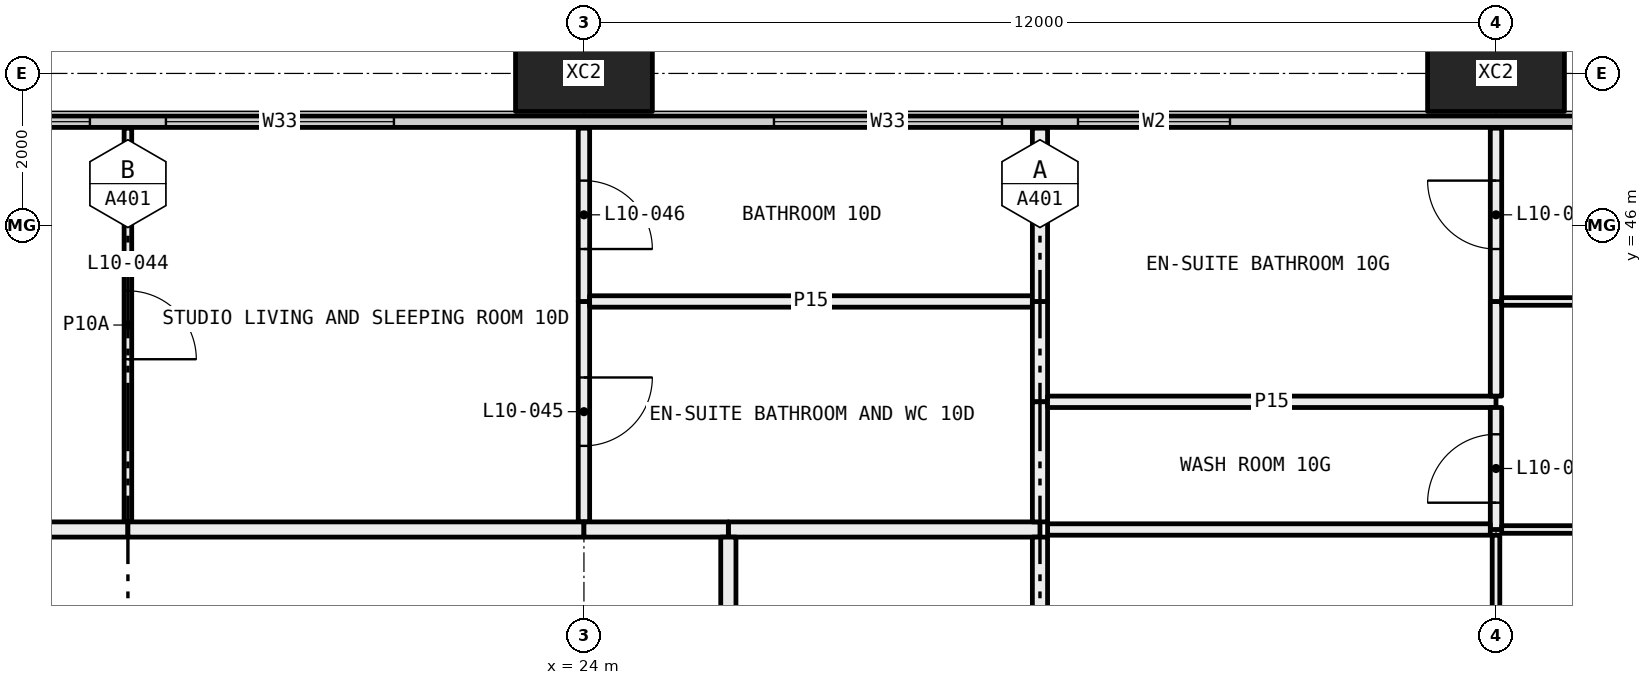
"""IFC4 building model, lengths in metres.
Left out: names, types, materials, properties, quantities, classifications, styles, units other than length and angle.
Written with IfcOpenShell. Run it as: python <this file> out.ifc"""

import sys

from ifc_helpers import new_model, si_unit, direction, frame, frame_2d, origin, origin_2d, place, context, subcontext, project, spatial, rectangle, hollow_rectangle, extrude, element, fill, save


model = new_model("IFC4")
c1 = context("Model", 3, precision=1e-05, world=origin(), true_north=direction((0.0, 1.0)))
c2 = subcontext(c1, "Body", "Model", "MODEL_VIEW")
j1 = project(units=[si_unit("LENGTHUNIT", "METRE"), si_unit("PLANEANGLEUNIT", "RADIAN")], contexts=[c1])
p1 = place(None, origin())
s1 = spatial("IfcSite", under=j1, at=p1, CompositionType="ELEMENT")
p2 = place(p1, origin())
s2 = spatial("IfcBuilding", under=s1, at=p2, CompositionType="ELEMENT")
p3 = place(p2, frame((0.0, 0.0, 47.25)))
s3 = spatial("IfcBuildingStorey", under=s2, at=p3, CompositionType="ELEMENT", Elevation=47.25)
for number, where, z_axis, x_axis in (
    (1, (24.0, 48.0, -0.4), (0.0, 0.0, 1.0), (1.0, 0.0, 0.0)),
    (2, (36.0, 48.0, -0.4), (0.0, 0.0, 1.0), (1.0, 0.0, 0.0)),
):
    element("IfcColumn", number, at=place(p3, frame(where, z_axis=z_axis, x_axis=x_axis)), inside=s3, PredefinedType="COLUMN", context=c2, shape_type="SweptSolid", body=[
        extrude(hollow_rectangle(XDim=1.8, YDim=1.0, WallThickness=0.07, at=origin_2d()), origin(), (0.0, 0.0, 1.0), 3.45),
    ])
p4 = place(p3, frame((6.56, 47.365, 0.0), z_axis=(0.0, 0.0, 1.0), x_axis=(1.0, 0.0, 0.0)))
e3 = element("IfcWall", 3, at=p4, inside=s3, PredefinedType="ELEMENTEDWALL", context=c2, shape_type="SweptSolid", body=[
    extrude(rectangle(XDim=58.88, YDim=0.15, at=frame_2d((29.44, 0.0))), origin(), (0.0, 0.0, 1.0), 3.05),
])
p5 = place(p4, frame((0.44, 0.0, 0.45)))
e4 = element("IfcOpeningElement", 4, at=p5, cuts=e3, PredefinedType="OPENING", context=c2, shape_type="SweptSolid", body=[
    extrude(rectangle(XDim=4.5, YDim=2.55, at=frame_2d((2.25, 1.275))), frame((0.0, 0.085, 0.0), z_axis=(0.0, -1.0, 0.0), x_axis=(1.0, 0.0, 0.0)), (0.0, 0.0, 1.0), 0.17),
])
p6 = place(p4, frame((7.94, 0.0, 0.45)))
e5 = element("IfcOpeningElement", 5, at=p6, cuts=e3, PredefinedType="OPENING", context=c2, shape_type="SweptSolid", body=[
    extrude(rectangle(XDim=3.0, YDim=2.55, at=frame_2d((1.5, 1.275))), frame((0.0, 0.085, 0.0), z_axis=(0.0, -1.0, 0.0), x_axis=(1.0, 0.0, 0.0)), (0.0, 0.0, 1.0), 0.17),
])
p7 = place(p4, frame((11.94, 0.0, 0.45)))
e6 = element("IfcOpeningElement", 6, at=p7, cuts=e3, PredefinedType="OPENING", context=c2, shape_type="SweptSolid", body=[
    extrude(rectangle(XDim=3.0, YDim=2.55, at=frame_2d((1.5, 1.275))), frame((0.0, 0.085, 0.0), z_axis=(0.0, -1.0, 0.0), x_axis=(1.0, 0.0, 0.0)), (0.0, 0.0, 1.0), 0.17),
])
p8 = place(p4, frame((19.94, 0.0, 0.45)))
e7 = element("IfcOpeningElement", 7, at=p8, cuts=e3, PredefinedType="OPENING", context=c2, shape_type="SweptSolid", body=[
    extrude(rectangle(XDim=3.0, YDim=2.55, at=frame_2d((1.5, 1.275))), frame((0.0, 0.085, 0.0), z_axis=(0.0, -1.0, 0.0), x_axis=(1.0, 0.0, 0.0)), (0.0, 0.0, 1.0), 0.17),
])
p9 = place(p4, frame((23.94, 0.0, 0.45)))
e8 = element("IfcOpeningElement", 8, at=p9, cuts=e3, PredefinedType="OPENING", context=c2, shape_type="SweptSolid", body=[
    extrude(rectangle(XDim=2.0, YDim=2.55, at=frame_2d((1.0, 1.275))), frame((0.0, 0.085, 0.0), z_axis=(0.0, -1.0, 0.0), x_axis=(1.0, 0.0, 0.0)), (0.0, 0.0, 1.0), 0.17),
])
p10 = place(p4, frame((31.94, 0.0, 0.45)))
e9 = element("IfcOpeningElement", 9, at=p10, cuts=e3, PredefinedType="OPENING", context=c2, shape_type="SweptSolid", body=[
    extrude(rectangle(XDim=3.0, YDim=2.55, at=frame_2d((1.5, 1.275))), frame((0.0, 0.085, 0.0), z_axis=(0.0, -1.0, 0.0), x_axis=(1.0, 0.0, 0.0)), (0.0, 0.0, 1.0), 0.17),
])
p11 = place(p4, frame((35.94, 0.0, 0.45)))
e10 = element("IfcOpeningElement", 10, at=p11, cuts=e3, PredefinedType="OPENING", context=c2, shape_type="SweptSolid", body=[
    extrude(rectangle(XDim=3.0, YDim=2.55, at=frame_2d((1.5, 1.275))), frame((0.0, 0.085, 0.0), z_axis=(0.0, -1.0, 0.0), x_axis=(1.0, 0.0, 0.0)), (0.0, 0.0, 1.0), 0.17),
])
p12 = place(p4, frame((43.94, 0.0, 0.45)))
e11 = element("IfcOpeningElement", 11, at=p12, cuts=e3, PredefinedType="OPENING", context=c2, shape_type="SweptSolid", body=[
    extrude(rectangle(XDim=3.0, YDim=2.55, at=frame_2d((1.5, 1.275))), frame((0.0, 0.085, 0.0), z_axis=(0.0, -1.0, 0.0), x_axis=(1.0, 0.0, 0.0)), (0.0, 0.0, 1.0), 0.17),
])
p13 = place(p4, frame((47.94, 0.0, 0.45)))
e12 = element("IfcOpeningElement", 12, at=p13, cuts=e3, PredefinedType="OPENING", context=c2, shape_type="SweptSolid", body=[
    extrude(rectangle(XDim=2.0, YDim=2.55, at=frame_2d((1.0, 1.275))), frame((0.0, 0.085, 0.0), z_axis=(0.0, -1.0, 0.0), x_axis=(1.0, 0.0, 0.0)), (0.0, 0.0, 1.0), 0.17),
])
p14 = place(p4, frame((53.94, 0.0, 0.45)))
e13 = element("IfcOpeningElement", 13, at=p14, cuts=e3, PredefinedType="OPENING", context=c2, shape_type="SweptSolid", body=[
    extrude(rectangle(XDim=4.5, YDim=2.55, at=frame_2d((2.25, 1.275))), frame((0.0, 0.085, 0.0), z_axis=(0.0, -1.0, 0.0), x_axis=(1.0, 0.0, 0.0)), (0.0, 0.0, 1.0), 0.17),
])
p15 = place(p3, frame((18.0, 42.1, 0.0), z_axis=(0.0, 0.0, 1.0), x_axis=(0.0, 1.0, 0.0)))
e14 = element("IfcWall", 14, at=p15, inside=s3, PredefinedType="PARTITIONING", context=c2, shape_type="SweptSolid", body=[
    extrude(rectangle(XDim=5.18, YDim=0.1, at=frame_2d((2.59, 0.0))), origin(), (0.0, 0.0, 1.0), 3.05),
])
p16 = place(p15, frame((2.14, 0.0, 0.0)))
e15 = element("IfcOpeningElement", 15, at=p16, cuts=e14, PredefinedType="OPENING", context=c2, shape_type="SweptSolid", body=[
    extrude(rectangle(XDim=0.9, YDim=2.1, at=frame_2d((0.45, 1.05))), frame((0.0, 0.06, 0.0), z_axis=(0.0, -1.0, 0.0), x_axis=(1.0, 0.0, 0.0)), (0.0, 0.0, 1.0), 0.12),
])
p17 = place(p3, frame((12.0, 42.0, 0.0), z_axis=(0.0, 0.0, 1.0), x_axis=(1.0, 0.0, 0.0)))
e16 = element("IfcWall", 16, at=p17, inside=s3, PredefinedType="PARTITIONING", context=c2, shape_type="SweptSolid", body=[
    extrude(rectangle(XDim=6.0, YDim=0.2, at=frame_2d((3.0, 0.0))), origin(), (0.0, 0.0, 1.0), 3.05),
])
p18 = place(p17, frame((2.5, 0.0, 0.0)))
e17 = element("IfcOpeningElement", 17, at=p18, cuts=e16, PredefinedType="OPENING", context=c2, shape_type="SweptSolid", body=[
    extrude(rectangle(XDim=1.0, YDim=2.1, at=frame_2d((0.5, 1.05))), frame((0.0, 0.11, 0.0), z_axis=(0.0, -1.0, 0.0), x_axis=(1.0, 0.0, 0.0)), (0.0, 0.0, 1.0), 0.22),
])
p19 = place(p3, frame((24.0, 42.1, 0.0), z_axis=(0.0, 0.0, 1.0), x_axis=(0.0, 1.0, 0.0)))
e18 = element("IfcWall", 18, at=p19, inside=s3, PredefinedType="PARTITIONING", context=c2, shape_type="SweptSolid", body=[
    extrude(rectangle(XDim=2.9, YDim=0.15, at=frame_2d((1.45, 0.0))), origin(), (0.0, 0.0, 1.0), 3.05),
])
p20 = place(p19, frame((1.0, 0.0, 0.0)))
e19 = element("IfcOpeningElement", 19, at=p20, cuts=e18, PredefinedType="OPENING", context=c2, shape_type="SweptSolid", body=[
    extrude(rectangle(XDim=0.9, YDim=2.1, at=frame_2d((0.45, 1.05))), frame((0.0, 0.085, 0.0), z_axis=(0.0, -1.0, 0.0), x_axis=(1.0, 0.0, 0.0)), (0.0, 0.0, 1.0), 0.17),
])
p21 = place(p3, frame((24.0, 45.0, 0.0), z_axis=(0.0, 0.0, 1.0), x_axis=(0.0, 1.0, 0.0)))
e20 = element("IfcWall", 20, at=p21, inside=s3, PredefinedType="PARTITIONING", context=c2, shape_type="SweptSolid", body=[
    extrude(rectangle(XDim=2.28, YDim=0.15, at=frame_2d((1.14, 0.0))), origin(), (0.0, 0.0, 1.0), 3.05),
])
p22 = place(p21, frame((0.69, 0.0, 0.0)))
e21 = element("IfcOpeningElement", 21, at=p22, cuts=e20, PredefinedType="OPENING", context=c2, shape_type="SweptSolid", body=[
    extrude(rectangle(XDim=0.9, YDim=2.1, at=frame_2d((0.45, 1.05))), frame((0.0, 0.085, 0.0), z_axis=(0.0, -1.0, 0.0), x_axis=(1.0, 0.0, 0.0)), (0.0, 0.0, 1.0), 0.17),
])
p23 = place(p3, frame((18.0, 42.0, 0.0), z_axis=(0.0, 0.0, 1.0), x_axis=(1.0, 0.0, 0.0)))
e22 = element("IfcWall", 22, at=p23, inside=s3, PredefinedType="PARTITIONING", context=c2, shape_type="SweptSolid", body=[
    extrude(rectangle(XDim=6.0, YDim=0.2, at=frame_2d((3.0, 0.0))), origin(), (0.0, 0.0, 1.0), 3.05),
])
p24 = place(p3, frame((29.9, 45.0, 0.0), z_axis=(0.0, 0.0, 1.0), x_axis=(-1.0, 0.0, 0.0)))
e23 = element("IfcWall", 23, at=p24, inside=s3, PredefinedType="PARTITIONING", context=c2, shape_type="SweptSolid", body=[
    extrude(rectangle(XDim=5.825, YDim=0.15, at=frame_2d((2.913, 0.0))), origin(), (0.0, 0.0, 1.0), 3.05),
])
p25 = place(p3, frame((25.9, 42.0, 0.0), z_axis=(0.0, 0.0, 1.0), x_axis=(1.0, 0.0, 0.0)))
e24 = element("IfcWall", 24, at=p25, inside=s3, PredefinedType="PARTITIONING", context=c2, shape_type="SweptSolid", body=[
    extrude(rectangle(XDim=4.1, YDim=0.2, at=frame_2d((2.05, 0.0))), origin(), (0.0, 0.0, 1.0), 3.05),
])
p26 = place(p3, frame((30.0, 43.68, 0.0), z_axis=(0.0, 0.0, 1.0), x_axis=(0.0, 1.0, 0.0)))
e25 = element("IfcWall", 25, at=p26, inside=s3, PredefinedType="PARTITIONING", context=c2, shape_type="SweptSolid", body=[
    extrude(rectangle(XDim=1.32, YDim=0.2, at=frame_2d((0.66, 0.0))), origin(), (0.0, 0.0, 1.0), 3.05),
])
p27 = place(p3, frame((30.0, 42.1, 0.0), z_axis=(0.0, 0.0, 1.0), x_axis=(0.0, 1.0, 0.0)))
e26 = element("IfcWall", 26, at=p27, inside=s3, PredefinedType="PARTITIONING", context=c2, shape_type="SweptSolid", body=[
    extrude(rectangle(XDim=1.58, YDim=0.2, at=frame_2d((0.79, 0.0))), origin(), (0.0, 0.0, 1.0), 3.05),
])
p28 = place(p3, frame((24.0, 42.0, 0.0), z_axis=(0.0, 0.0, 1.0), x_axis=(1.0, 0.0, 0.0)))
e27 = element("IfcWall", 27, at=p28, inside=s3, PredefinedType="PARTITIONING", context=c2, shape_type="SweptSolid", body=[
    extrude(rectangle(XDim=1.9, YDim=0.2, at=frame_2d((0.95, 0.0))), origin(), (0.0, 0.0, 1.0), 3.05),
])
p29 = place(p3, frame((30.0, 45.0, 0.0), z_axis=(0.0, 0.0, 1.0), x_axis=(0.0, 1.0, 0.0)))
e28 = element("IfcWall", 28, at=p29, inside=s3, PredefinedType="PARTITIONING", context=c2, shape_type="SweptSolid", body=[
    extrude(rectangle(XDim=2.28, YDim=0.2, at=frame_2d((1.14, 0.0))), origin(), (0.0, 0.0, 1.0), 3.05),
])
p30 = place(p3, frame((30.0, 36.1, 0.0), z_axis=(0.0, 0.0, 1.0), x_axis=(0.0, 1.0, 0.0)))
e29 = element("IfcWall", 29, at=p30, inside=s3, PredefinedType="PARTITIONING", context=c2, shape_type="SweptSolid", body=[
    extrude(rectangle(XDim=5.8, YDim=0.2, at=frame_2d((2.9, 0.0))), origin(), (0.0, 0.0, 1.0), 3.05),
])
p31 = place(p3, frame((25.9, 41.9, 0.0), z_axis=(0.0, 0.0, 1.0), x_axis=(0.0, -1.0, 0.0)))
e30 = element("IfcWall", 30, at=p31, inside=s3, PredefinedType="PARTITIONING", context=c2, shape_type="SweptSolid", body=[
    extrude(rectangle(XDim=6.0, YDim=0.2, at=frame_2d((3.0, 0.0))), origin(), (0.0, 0.0, 1.0), 2.45),
])
p32 = place(p31, frame((2.55, 0.0, 0.0)))
e31 = element("IfcOpeningElement", 31, at=p32, cuts=e30, PredefinedType="OPENING", context=c2, shape_type="SweptSolid", body=[
    extrude(rectangle(XDim=0.9, YDim=2.1, at=frame_2d((0.45, 1.05))), frame((0.0, 0.11, 0.0), z_axis=(0.0, -1.0, 0.0), x_axis=(1.0, 0.0, 0.0)), (0.0, 0.0, 1.0), 0.22),
])
p33 = place(p3, frame((30.1, 43.68, 0.0), z_axis=(0.0, 0.0, 1.0), x_axis=(1.0, 0.0, 0.0)))
e32 = element("IfcWall", 32, at=p33, inside=s3, PredefinedType="PARTITIONING", context=c2, shape_type="SweptSolid", body=[
    extrude(rectangle(XDim=5.9, YDim=0.15, at=frame_2d((2.95, 0.0))), origin(), (0.0, 0.0, 1.0), 2.45),
])
p34 = place(p3, frame((36.0, 43.755, 0.0), z_axis=(0.0, 0.0, 1.0), x_axis=(0.0, 1.0, 0.0)))
e33 = element("IfcWall", 33, at=p34, inside=s3, PredefinedType="PARTITIONING", context=c2, shape_type="SweptSolid", body=[
    extrude(rectangle(XDim=1.245, YDim=0.15, at=frame_2d((0.623, 0.0))), origin(), (0.0, 0.0, 1.0), 2.45),
])
p35 = place(p3, frame((36.0, 45.0, 0.0), z_axis=(0.0, 0.0, 1.0), x_axis=(0.0, 1.0, 0.0)))
e34 = element("IfcWall", 34, at=p35, inside=s3, PredefinedType="PARTITIONING", context=c2, shape_type="SweptSolid", body=[
    extrude(rectangle(XDim=2.28, YDim=0.15, at=frame_2d((1.14, 0.0))), origin(), (0.0, 0.0, 1.0), 2.45),
])
p36 = place(p35, frame((0.69, 0.0, 0.0)))
e35 = element("IfcOpeningElement", 35, at=p36, cuts=e34, PredefinedType="OPENING", context=c2, shape_type="SweptSolid", body=[
    extrude(rectangle(XDim=0.9, YDim=2.1, at=frame_2d((0.45, 1.05))), frame((0.0, 0.085, 0.0), z_axis=(0.0, -1.0, 0.0), x_axis=(1.0, 0.0, 0.0)), (0.0, 0.0, 1.0), 0.17),
])
p37 = place(p3, frame((36.0, 42.0, 0.0), z_axis=(0.0, 0.0, 1.0), x_axis=(0.0, 1.0, 0.0)))
e36 = element("IfcWall", 36, at=p37, inside=s3, PredefinedType="PARTITIONING", context=c2, shape_type="SweptSolid", body=[
    extrude(rectangle(XDim=1.605, YDim=0.15, at=frame_2d((0.802, 0.0))), origin(), (0.0, 0.0, 1.0), 2.45),
])
p38 = place(p37, frame((0.353, 0.0, 0.0)))
e37 = element("IfcOpeningElement", 37, at=p38, cuts=e36, PredefinedType="OPENING", context=c2, shape_type="SweptSolid", body=[
    extrude(rectangle(XDim=0.9, YDim=2.1, at=frame_2d((0.45, 1.05))), frame((0.0, 0.085, 0.0), z_axis=(0.0, -1.0, 0.0), x_axis=(1.0, 0.0, 0.0)), (0.0, 0.0, 1.0), 0.17),
])
p39 = place(p3, frame((30.1, 42.0, 0.0), z_axis=(0.0, 0.0, 1.0), x_axis=(1.0, 0.0, 0.0)))
e38 = element("IfcWall", 38, at=p39, inside=s3, PredefinedType="PARTITIONING", context=c2, shape_type="SweptSolid", body=[
    extrude(rectangle(XDim=5.825, YDim=0.15, at=frame_2d((2.913, 0.0))), origin(), (0.0, 0.0, 1.0), 2.45),
])
p40 = place(p3, frame((48.0, 45.0, 0.0), z_axis=(0.0, 0.0, 1.0), x_axis=(-1.0, 0.0, 0.0)))
e39 = element("IfcWall", 39, at=p40, inside=s3, PredefinedType="PARTITIONING", context=c2, shape_type="SweptSolid", body=[
    extrude(rectangle(XDim=11.925, YDim=0.1, at=frame_2d((5.962, 0.0))), origin(), (0.0, 0.0, 1.0), 2.45),
])
p41 = place(p40, frame((5.512, 0.0, 0.0)))
e40 = element("IfcOpeningElement", 40, at=p41, cuts=e39, PredefinedType="OPENING", context=c2, shape_type="SweptSolid", body=[
    extrude(rectangle(XDim=0.9, YDim=2.1, at=frame_2d((0.45, 1.05))), frame((0.0, 0.06, 0.0), z_axis=(0.0, -1.0, 0.0), x_axis=(1.0, 0.0, 0.0)), (0.0, 0.0, 1.0), 0.12),
])
p42 = place(p3, frame((36.075, 42.0, 0.0), z_axis=(0.0, 0.0, 1.0), x_axis=(1.0, 0.0, 0.0)))
e41 = element("IfcWall", 41, at=p42, inside=s3, PredefinedType="PARTITIONING", context=c2, shape_type="SweptSolid", body=[
    extrude(rectangle(XDim=5.85, YDim=0.1, at=frame_2d((2.925, 0.0))), origin(), (0.0, 0.0, 1.0), 2.45),
])
p43 = place(p42, frame((2.475, 0.0, 0.0)))
e42 = element("IfcOpeningElement", 42, at=p43, cuts=e41, PredefinedType="OPENING", context=c2, shape_type="SweptSolid", body=[
    extrude(rectangle(XDim=0.9, YDim=2.1, at=frame_2d((0.45, 1.05))), frame((0.0, 0.06, 0.0), z_axis=(0.0, -1.0, 0.0), x_axis=(1.0, 0.0, 0.0)), (0.0, 0.0, 1.0), 0.12),
])
p44 = place(p3, frame((36.0, 36.8, 0.0), z_axis=(0.0, 0.0, 1.0), x_axis=(0.0, 1.0, 0.0)))
e43 = element("IfcWall", 43, at=p44, inside=s3, PredefinedType="PARTITIONING", context=c2, shape_type="SweptSolid", body=[
    extrude(rectangle(XDim=5.125, YDim=0.1, at=frame_2d((2.562, 0.0))), origin(), (0.0, 0.0, 1.0), 2.45),
])
p45 = place(p44, frame((2.113, 0.0, 0.0)))
e44 = element("IfcOpeningElement", 44, at=p45, cuts=e43, PredefinedType="OPENING", context=c2, shape_type="SweptSolid", body=[
    extrude(rectangle(XDim=0.9, YDim=2.1, at=frame_2d((0.45, 1.05))), frame((0.0, 0.06, 0.0), z_axis=(0.0, -1.0, 0.0), x_axis=(1.0, 0.0, 0.0)), (0.0, 0.0, 1.0), 0.12),
])
p46 = place(p6, origin())
e45 = element("IfcWindow", 45, at=p46, inside=s3, PartitioningType="SINGLE_PANEL", PredefinedType="WINDOW", context=c2, shape_type="SweptSolid", body=[
    extrude(rectangle(XDim=3.0, YDim=2.55, at=frame_2d((1.5, 1.275))), frame((0.0, 0.03, 0.0), z_axis=(0.0, -1.0, 0.0), x_axis=(1.0, 0.0, 0.0)), (0.0, 0.0, 1.0), 0.06),
])
fill(e5, e45)
p47 = place(p7, origin())
e46 = element("IfcWindow", 46, at=p47, inside=s3, PartitioningType="SINGLE_PANEL", PredefinedType="WINDOW", context=c2, shape_type="SweptSolid", body=[
    extrude(rectangle(XDim=3.0, YDim=2.55, at=frame_2d((1.5, 1.275))), frame((0.0, 0.03, 0.0), z_axis=(0.0, -1.0, 0.0), x_axis=(1.0, 0.0, 0.0)), (0.0, 0.0, 1.0), 0.06),
])
fill(e6, e46)
p48 = place(p8, origin())
e47 = element("IfcWindow", 47, at=p48, inside=s3, PartitioningType="SINGLE_PANEL", PredefinedType="WINDOW", context=c2, shape_type="SweptSolid", body=[
    extrude(rectangle(XDim=3.0, YDim=2.55, at=frame_2d((1.5, 1.275))), frame((0.0, 0.03, 0.0), z_axis=(0.0, -1.0, 0.0), x_axis=(1.0, 0.0, 0.0)), (0.0, 0.0, 1.0), 0.06),
])
fill(e7, e47)
p49 = place(p9, origin())
e48 = element("IfcWindow", 48, at=p49, inside=s3, PartitioningType="SINGLE_PANEL", PredefinedType="WINDOW", context=c2, shape_type="SweptSolid", body=[
    extrude(rectangle(XDim=2.0, YDim=2.55, at=frame_2d((1.0, 1.275))), frame((0.0, 0.03, 0.0), z_axis=(0.0, -1.0, 0.0), x_axis=(1.0, 0.0, 0.0)), (0.0, 0.0, 1.0), 0.06),
])
fill(e8, e48)
p50 = place(p16, frame((0.9, 0.0, 0.0), x_axis=(-1.0, 0.0, 0.0)))
e49 = element("IfcDoor", 49, at=p50, inside=s3, OperationType="SINGLE_SWING_LEFT", PredefinedType="DOOR", context=c2, shape_type="SweptSolid", body=[
    extrude(rectangle(XDim=0.9, YDim=2.1, at=frame_2d((0.45, 1.05))), frame((0.0, 0.025, 0.0), z_axis=(0.0, -1.0, 0.0), x_axis=(1.0, 0.0, 0.0)), (0.0, 0.0, 1.0), 0.05),
])
fill(e15, e49)
p51 = place(p20, frame((0.9, 0.0, 0.0), x_axis=(-1.0, 0.0, 0.0)))
e50 = element("IfcDoor", 50, at=p51, inside=s3, OperationType="SINGLE_SWING_RIGHT", PredefinedType="DOOR", context=c2, shape_type="SweptSolid", body=[
    extrude(rectangle(XDim=0.9, YDim=2.1, at=frame_2d((0.45, 1.05))), frame((0.0, 0.025, 0.0), z_axis=(0.0, -1.0, 0.0), x_axis=(1.0, 0.0, 0.0)), (0.0, 0.0, 1.0), 0.05),
])
fill(e19, e50)
p52 = place(p22, frame((0.9, 0.0, 0.0), x_axis=(-1.0, 0.0, 0.0)))
e51 = element("IfcDoor", 51, at=p52, inside=s3, OperationType="SINGLE_SWING_LEFT", PredefinedType="DOOR", context=c2, shape_type="SweptSolid", body=[
    extrude(rectangle(XDim=0.9, YDim=2.1, at=frame_2d((0.45, 1.05))), frame((0.0, 0.025, 0.0), z_axis=(0.0, -1.0, 0.0), x_axis=(1.0, 0.0, 0.0)), (0.0, 0.0, 1.0), 0.05),
])
fill(e21, e51)
p53 = place(p36, origin())
e52 = element("IfcDoor", 52, at=p53, inside=s3, OperationType="SINGLE_SWING_LEFT", PredefinedType="DOOR", context=c2, shape_type="SweptSolid", body=[
    extrude(rectangle(XDim=0.9, YDim=2.1, at=frame_2d((0.45, 1.05))), frame((0.0, 0.025, 0.0), z_axis=(0.0, -1.0, 0.0), x_axis=(1.0, 0.0, 0.0)), (0.0, 0.0, 1.0), 0.05),
])
fill(e35, e52)
p54 = place(p38, origin())
e53 = element("IfcDoor", 53, at=p54, inside=s3, OperationType="SINGLE_SWING_RIGHT", PredefinedType="DOOR", context=c2, shape_type="SweptSolid", body=[
    extrude(rectangle(XDim=0.9, YDim=2.1, at=frame_2d((0.45, 1.05))), frame((0.0, 0.025, 0.0), z_axis=(0.0, -1.0, 0.0), x_axis=(1.0, 0.0, 0.0)), (0.0, 0.0, 1.0), 0.05),
])
fill(e37, e53)
save(model, sys.argv[1])
